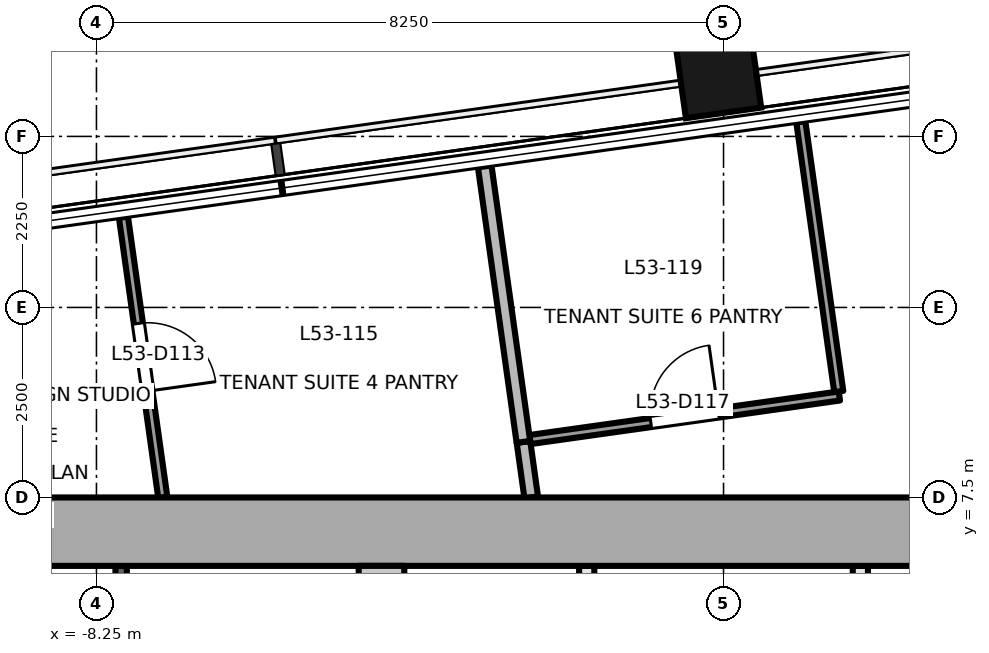
"""IFC4 building model, lengths in metres.
Left out: names, types, materials, properties, quantities, classifications, styles, units other than length and angle.
Written with IfcOpenShell. Run it as: python <this file> out.ifc"""

import sys

from ifc_helpers import new_model, si_unit, direction, frame, frame_2d, origin, origin_2d, place, context, subcontext, project, spatial, rectangle, extrude, element, fill, save


model = new_model("IFC4")
c1 = context("Model", 3, precision=1e-05, world=origin(), true_north=direction((0.0, 1.0)))
c2 = subcontext(c1, "Body", "Model", "MODEL_VIEW")
j1 = project(units=[si_unit("LENGTHUNIT", "METRE"), si_unit("PLANEANGLEUNIT", "RADIAN")], contexts=[c1])
p1 = place(None, origin())
s1 = spatial("IfcSite", under=j1, at=p1, CompositionType="ELEMENT")
p2 = place(p1, origin())
s2 = spatial("IfcBuilding", under=s1, at=p2, CompositionType="ELEMENT")
p3 = place(p2, frame((0.0, 0.0, 233.0)))
s3 = spatial("IfcBuildingStorey", under=s2, at=p3, CompositionType="ELEMENT", Elevation=233.0)
p4 = place(p3, frame((-0.125, 13.451, -0.2), z_axis=(0.0, 0.0, 1.0), x_axis=(0.990268068742, 0.13917310096, 0.0)))
e1 = element("IfcColumn", 1, at=p4, inside=s3, PredefinedType="COLUMN", context=c2, shape_type="SweptSolid", body=[
    extrude(rectangle(XDim=1.0, YDim=1.8, at=origin_2d()), origin(), (0.0, 0.0, 1.0), 3.9),
])
p5 = place(p3, frame((-18.0, 7.05, -0.2), z_axis=(0.0, 0.0, 1.0), x_axis=(1.0, 0.0, 0.0)))
e2 = element("IfcWall", 2, at=p5, inside=s3, PredefinedType="SHEAR", context=c2, shape_type="SweptSolid", body=[
    extrude(rectangle(XDim=36.0, YDim=0.9, at=frame_2d((18.0, 0.0))), origin(), (0.0, 0.0, 1.0), 3.9),
])
p6 = place(p3, frame((-4.5, -6.6, -0.2), z_axis=(0.0, 0.0, 1.0), x_axis=(0.0, 1.0, 0.0)))
e3 = element("IfcWall", 3, at=p6, inside=s3, PredefinedType="SHEAR", context=c2, shape_type="SweptSolid", body=[
    extrude(rectangle(XDim=13.2, YDim=0.6, at=frame_2d((6.6, 0.0))), origin(), (0.0, 0.0, 1.0), 3.9),
])
p7 = place(p3, frame((-7.925, -6.6, 0.0), z_axis=(0.0, 0.0, 1.0), x_axis=(0.0, 1.0, 0.0)))
e4 = element("IfcWall", 4, at=p7, inside=s3, PredefinedType="PARTITIONING", context=c2, shape_type="SweptSolid", body=[
    extrude(rectangle(XDim=13.2, YDim=0.15, at=frame_2d((6.6, 0.0))), origin(), (0.0, 0.0, 1.0), 3.7),
])
p8 = place(p7, frame((0.87, 0.0, 0.0)))
e5 = element("IfcOpeningElement", 5, at=p8, cuts=e4, PredefinedType="OPENING", context=c2, shape_type="SweptSolid", body=[
    extrude(rectangle(XDim=0.9, YDim=2.1, at=frame_2d((0.45, 1.05))), frame((0.0, 0.085, 0.0), z_axis=(0.0, -1.0, 0.0), x_axis=(1.0, 0.0, 0.0)), (0.0, 0.0, 1.0), 0.171),
])
p9 = place(p7, frame((3.51, 0.0, 0.0)))
e6 = element("IfcOpeningElement", 6, at=p9, cuts=e4, PredefinedType="OPENING", context=c2, shape_type="SweptSolid", body=[
    extrude(rectangle(XDim=0.9, YDim=2.1, at=frame_2d((0.45, 1.05))), frame((0.0, 0.085, 0.0), z_axis=(0.0, -1.0, 0.0), x_axis=(1.0, 0.0, 0.0)), (0.0, 0.0, 1.0), 0.171),
])
p10 = place(p7, frame((6.15, 0.0, 0.0)))
e7 = element("IfcOpeningElement", 7, at=p10, cuts=e4, PredefinedType="OPENING", context=c2, shape_type="SweptSolid", body=[
    extrude(rectangle(XDim=0.9, YDim=2.1, at=frame_2d((0.45, 1.05))), frame((0.0, 0.085, 0.0), z_axis=(0.0, -1.0, 0.0), x_axis=(1.0, 0.0, 0.0)), (0.0, 0.0, 1.0), 0.171),
])
p11 = place(p7, frame((8.79, 0.0, 0.0)))
e8 = element("IfcOpeningElement", 8, at=p11, cuts=e4, PredefinedType="OPENING", context=c2, shape_type="SweptSolid", body=[
    extrude(rectangle(XDim=0.9, YDim=2.1, at=frame_2d((0.45, 1.05))), frame((0.0, 0.085, 0.0), z_axis=(0.0, -1.0, 0.0), x_axis=(1.0, 0.0, 0.0)), (0.0, 0.0, 1.0), 0.171),
])
p12 = place(p7, frame((11.43, 0.0, 0.0)))
e9 = element("IfcOpeningElement", 9, at=p12, cuts=e4, PredefinedType="OPENING", context=c2, shape_type="SweptSolid", body=[
    extrude(rectangle(XDim=0.9, YDim=2.1, at=frame_2d((0.45, 1.05))), frame((0.0, 0.085, 0.0), z_axis=(0.0, -1.0, 0.0), x_axis=(1.0, 0.0, 0.0)), (0.0, 0.0, 1.0), 0.171),
])
p13 = place(p3, frame((-1.8, -6.6, 0.0), z_axis=(0.0, 0.0, 1.0), x_axis=(0.0, 1.0, 0.0)))
e10 = element("IfcWall", 10, at=p13, inside=s3, PredefinedType="PARTITIONING", context=c2, shape_type="SweptSolid", body=[
    extrude(rectangle(XDim=13.2, YDim=0.2, at=frame_2d((6.6, 0.0))), origin(), (0.0, 0.0, 1.0), 3.7),
])
p14 = place(p13, frame((0.55, 0.0, 0.0)))
e11 = element("IfcOpeningElement", 11, at=p14, cuts=e10, PredefinedType="OPENING", context=c2, shape_type="SweptSolid", body=[
    extrude(rectangle(XDim=0.9, YDim=2.1, at=frame_2d((0.45, 1.05))), frame((0.0, 0.111, 0.0), z_axis=(0.0, -1.0, 0.0), x_axis=(1.0, 0.0, 0.0)), (0.0, 0.0, 1.0), 0.221),
])
p15 = place(p13, frame((2.9, 0.0, 0.0)))
e12 = element("IfcOpeningElement", 12, at=p15, cuts=e10, PredefinedType="OPENING", context=c2, shape_type="SweptSolid", body=[
    extrude(rectangle(XDim=1.2, YDim=2.1, at=frame_2d((0.6, 1.05))), frame((0.0, 0.111, 0.0), z_axis=(0.0, -1.0, 0.0), x_axis=(1.0, 0.0, 0.0)), (0.0, 0.0, 1.0), 0.221),
])
p16 = place(p13, frame((5.7, 0.0, 0.0)))
e13 = element("IfcOpeningElement", 13, at=p16, cuts=e10, PredefinedType="OPENING", context=c2, shape_type="SweptSolid", body=[
    extrude(rectangle(XDim=1.2, YDim=2.1, at=frame_2d((0.6, 1.05))), frame((0.0, 0.111, 0.0), z_axis=(0.0, -1.0, 0.0), x_axis=(1.0, 0.0, 0.0)), (0.0, 0.0, 1.0), 0.221),
])
p17 = place(p13, frame((8.5, 0.0, 0.0)))
e14 = element("IfcOpeningElement", 14, at=p17, cuts=e10, PredefinedType="OPENING", context=c2, shape_type="SweptSolid", body=[
    extrude(rectangle(XDim=1.2, YDim=2.1, at=frame_2d((0.6, 1.05))), frame((0.0, 0.111, 0.0), z_axis=(0.0, -1.0, 0.0), x_axis=(1.0, 0.0, 0.0)), (0.0, 0.0, 1.0), 0.221),
])
p18 = place(p13, frame((11.3, 0.0, 0.0)))
e15 = element("IfcOpeningElement", 15, at=p18, cuts=e10, PredefinedType="OPENING", context=c2, shape_type="SweptSolid", body=[
    extrude(rectangle(XDim=1.2, YDim=2.1, at=frame_2d((0.6, 1.05))), frame((0.0, 0.111, 0.0), z_axis=(0.0, -1.0, 0.0), x_axis=(1.0, 0.0, 0.0)), (0.0, 0.0, 1.0), 0.221),
])
p19 = place(p3, frame((1.8, -6.6, 0.0), z_axis=(0.0, 0.0, 1.0), x_axis=(0.0, 1.0, 0.0)))
e16 = element("IfcWall", 16, at=p19, inside=s3, PredefinedType="PARTITIONING", context=c2, shape_type="SweptSolid", body=[
    extrude(rectangle(XDim=13.2, YDim=0.2, at=frame_2d((6.6, 0.0))), origin(), (0.0, 0.0, 1.0), 3.7),
])
p20 = place(p19, frame((0.55, 0.0, 0.0)))
e17 = element("IfcOpeningElement", 17, at=p20, cuts=e16, PredefinedType="OPENING", context=c2, shape_type="SweptSolid", body=[
    extrude(rectangle(XDim=0.9, YDim=2.1, at=frame_2d((0.45, 1.05))), frame((0.0, 0.111, 0.0), z_axis=(0.0, -1.0, 0.0), x_axis=(1.0, 0.0, 0.0)), (0.0, 0.0, 1.0), 0.221),
])
p21 = place(p19, frame((2.9, 0.0, 0.0)))
e18 = element("IfcOpeningElement", 18, at=p21, cuts=e16, PredefinedType="OPENING", context=c2, shape_type="SweptSolid", body=[
    extrude(rectangle(XDim=1.2, YDim=2.1, at=frame_2d((0.6, 1.05))), frame((0.0, 0.111, 0.0), z_axis=(0.0, -1.0, 0.0), x_axis=(1.0, 0.0, 0.0)), (0.0, 0.0, 1.0), 0.221),
])
p22 = place(p19, frame((5.7, 0.0, 0.0)))
e19 = element("IfcOpeningElement", 19, at=p22, cuts=e16, PredefinedType="OPENING", context=c2, shape_type="SweptSolid", body=[
    extrude(rectangle(XDim=1.2, YDim=2.1, at=frame_2d((0.6, 1.05))), frame((0.0, 0.111, 0.0), z_axis=(0.0, -1.0, 0.0), x_axis=(1.0, 0.0, 0.0)), (0.0, 0.0, 1.0), 0.221),
])
p23 = place(p19, frame((8.5, 0.0, 0.0)))
e20 = element("IfcOpeningElement", 20, at=p23, cuts=e16, PredefinedType="OPENING", context=c2, shape_type="SweptSolid", body=[
    extrude(rectangle(XDim=1.2, YDim=2.1, at=frame_2d((0.6, 1.05))), frame((0.0, 0.111, 0.0), z_axis=(0.0, -1.0, 0.0), x_axis=(1.0, 0.0, 0.0)), (0.0, 0.0, 1.0), 0.221),
])
p24 = place(p19, frame((11.3, 0.0, 0.0)))
e21 = element("IfcOpeningElement", 21, at=p24, cuts=e16, PredefinedType="OPENING", context=c2, shape_type="SweptSolid", body=[
    extrude(rectangle(XDim=1.2, YDim=2.1, at=frame_2d((0.6, 1.05))), frame((0.0, 0.111, 0.0), z_axis=(0.0, -1.0, 0.0), x_axis=(1.0, 0.0, 0.0)), (0.0, 0.0, 1.0), 0.221),
])
p25 = place(p3, frame((-7.895, 11.188, 0.0), z_axis=(0.0, 0.0, 1.0), x_axis=(0.139108182039, -0.990277190331, 0.0)))
e22 = element("IfcWall", 22, at=p25, inside=s3, PredefinedType="PARTITIONING", context=c2, shape_type="SweptSolid", body=[
    extrude(rectangle(XDim=3.724, YDim=0.12, at=frame_2d((1.862, 0.0))), origin(), (0.0, 0.0, 1.0), 3.7),
])
p26 = place(p25, frame((1.412, 0.0, 0.0)))
e23 = element("IfcOpeningElement", 23, at=p26, cuts=e22, PredefinedType="OPENING", context=c2, shape_type="SweptSolid", body=[
    extrude(rectangle(XDim=0.9, YDim=2.1, at=frame_2d((0.45, 1.05))), frame((0.0, 0.071, 0.0), z_axis=(0.0, -1.0, 0.0), x_axis=(1.0, 0.0, 0.0)), (0.0, 0.0, 1.0), 0.141),
])
p27 = place(p3, frame((-2.632, 8.23, 0.0), z_axis=(0.0, 0.0, 1.0), x_axis=(0.138452925943, -0.99036901572, 0.0)))
e24 = element("IfcWall", 24, at=p27, inside=s3, PredefinedType="PARTITIONING", context=c2, shape_type="SweptSolid", body=[
    extrude(rectangle(XDim=0.737, YDim=0.18, at=frame_2d((0.369, 0.0))), origin(), (0.0, 0.0, 1.0), 3.7),
])
p28 = place(p3, frame((-3.142, 11.856, 0.0), z_axis=(0.0, 0.0, 1.0), x_axis=(0.139058624332, -0.990284150635, 0.0)))
e25 = element("IfcWall", 25, at=p28, inside=s3, PredefinedType="PARTITIONING", context=c2, shape_type="SweptSolid", body=[
    extrude(rectangle(XDim=3.661, YDim=0.18, at=frame_2d((1.83, 0.0))), origin(), (0.0, 0.0, 1.0), 3.7),
])
p29 = place(p3, frame((-2.546, 8.262, 0.0), z_axis=(0.0, 0.0, 1.0), x_axis=(0.990233783149, 0.139416837975, 0.0)))
e26 = element("IfcWall", 26, at=p29, inside=s3, PredefinedType="PARTITIONING", context=c2, shape_type="SweptSolid", body=[
    extrude(rectangle(XDim=4.11, YDim=0.12, at=frame_2d((2.055, 0.0))), origin(), (0.0, 0.0, 1.0), 3.4),
])
p30 = place(p29, frame((1.605, 0.0, 0.0)))
e27 = element("IfcOpeningElement", 27, at=p30, cuts=e26, PredefinedType="OPENING", context=c2, shape_type="SweptSolid", body=[
    extrude(rectangle(XDim=0.9, YDim=2.1, at=frame_2d((0.45, 1.05))), frame((0.0, 0.071, 0.0), z_axis=(0.0, -1.0, 0.0), x_axis=(1.0, 0.0, 0.0)), (0.0, 0.0, 1.0), 0.141),
])
p31 = place(p3, frame((1.516, 8.894, 0.0), z_axis=(0.0, 0.0, 1.0), x_axis=(-0.139321670591, 0.990247177276, 0.0)))
e28 = element("IfcWall", 28, at=p31, inside=s3, PredefinedType="PARTITIONING", context=c2, shape_type="SweptSolid", body=[
    extrude(rectangle(XDim=3.582, YDim=0.12, at=frame_2d((1.791, 0.0))), origin(), (0.0, 0.0, 1.0), 3.7),
])
p32 = place(p26, origin())
e29 = element("IfcDoor", 29, at=p32, inside=s3, OperationType="SINGLE_SWING_RIGHT", PredefinedType="DOOR", context=c2, shape_type="SweptSolid", body=[
    extrude(rectangle(XDim=0.9, YDim=2.1, at=frame_2d((0.45, 1.05))), frame((0.0, 0.025, 0.0), z_axis=(0.0, -1.0, 0.0), x_axis=(1.0, 0.0, 0.0)), (0.0, 0.0, 1.0), 0.05),
])
fill(e23, e29)
p33 = place(p30, origin())
e30 = element("IfcDoor", 30, at=p33, inside=s3, OperationType="SINGLE_SWING_RIGHT", PredefinedType="DOOR", context=c2, shape_type="SweptSolid", body=[
    extrude(rectangle(XDim=0.9, YDim=2.1, at=frame_2d((0.45, 1.05))), frame((0.0, 0.025, 0.0), z_axis=(0.0, -1.0, 0.0), x_axis=(1.0, 0.0, 0.0)), (0.0, 0.0, 1.0), 0.05),
])
fill(e27, e30)
save(model, sys.argv[1])
